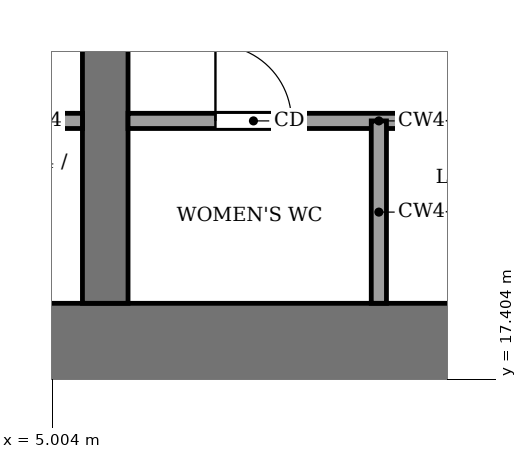
"""IFC4 building model, lengths in metres.
Left out: names, types, materials, properties, quantities, classifications, styles, units other than length and angle.
Written with IfcOpenShell. Run it as: python <this file> out.ifc"""

import sys

from ifc_helpers import new_model, si_unit, direction, frame, frame_2d, origin, place, context, subcontext, project, spatial, rectangle, extrude, element, fill, save


model = new_model("IFC4")
c1 = context("Model", 3, precision=1e-05, world=origin(), true_north=direction((0.0, 1.0)))
c2 = subcontext(c1, "Body", "Model", "MODEL_VIEW")
j1 = project(units=[si_unit("LENGTHUNIT", "METRE"), si_unit("PLANEANGLEUNIT", "RADIAN")], contexts=[c1])
p1 = place(None, origin())
s1 = spatial("IfcSite", under=j1, at=p1, CompositionType="ELEMENT")
p2 = place(p1, origin())
s2 = spatial("IfcBuilding", under=s1, at=p2, CompositionType="ELEMENT")
p3 = place(p2, frame((0.0, 0.0, 110.0)))
s3 = spatial("IfcBuildingStorey", under=s2, at=p3, CompositionType="ELEMENT", Elevation=110.0)
p4 = place(p3, frame((-13.8, 17.8, -0.13), z_axis=(0.0, 0.0, 1.0), x_axis=(1.0, 0.0, 0.0)))
e1 = element("IfcWall", 1, at=p4, inside=s3, PredefinedType="SHEAR", context=c2, shape_type="SweptSolid", body=[
    extrude(rectangle(XDim=27.6, YDim=1.2, at=frame_2d((13.8, 0.0))), origin(), (0.0, 0.0, 1.0), 3.88),
])
p5 = place(p3, frame((5.7, 18.4, -0.13), z_axis=(0.0, 0.0, 1.0), x_axis=(0.0, 1.0, 0.0)))
e2 = element("IfcWall", 2, at=p5, inside=s3, PredefinedType="SHEAR", context=c2, shape_type="SweptSolid", body=[
    extrude(rectangle(XDim=19.2, YDim=0.6, at=frame_2d((9.6, 0.0))), origin(), (0.0, 0.0, 1.0), 3.88),
])
p6 = place(p5, frame((8.35, 0.0, 0.13)))
e3 = element("IfcOpeningElement", 3, at=p6, cuts=e2, PredefinedType="OPENING", context=c2, shape_type="SweptSolid", body=[
    extrude(rectangle(XDim=0.9, YDim=2.1, at=frame_2d((0.45, 1.05))), frame((0.0, 0.31, 0.0), z_axis=(0.0, -1.0, 0.0), x_axis=(1.0, 0.0, 0.0)), (0.0, 0.0, 1.0), 0.62),
])
p7 = place(p5, frame((13.3, 0.0, 0.13)))
e4 = element("IfcOpeningElement", 4, at=p7, cuts=e2, PredefinedType="OPENING", context=c2, shape_type="SweptSolid", body=[
    extrude(rectangle(XDim=2.4, YDim=2.4, at=frame_2d((1.2, 1.2))), frame((0.0, 0.31, 0.0), z_axis=(0.0, -1.0, 0.0), x_axis=(1.0, 0.0, 0.0)), (0.0, 0.0, 1.0), 0.62),
])
p8 = place(p3, frame((-5.4, 20.8, 0.0), z_axis=(0.0, 0.0, 1.0), x_axis=(1.0, 0.0, 0.0)))
e5 = element("IfcWall", 5, at=p8, inside=s3, PredefinedType="PARTITIONING", context=c2, shape_type="SweptSolid", body=[
    extrude(rectangle(XDim=10.8, YDim=0.2, at=frame_2d((5.4, 0.0))), origin(), (0.0, 0.0, 1.0), 3.75),
])
p9 = place(p8, frame((0.75, 0.0, 0.0)))
e6 = element("IfcOpeningElement", 6, at=p9, cuts=e5, PredefinedType="OPENING", context=c2, shape_type="SweptSolid", body=[
    extrude(rectangle(XDim=1.2, YDim=2.2, at=frame_2d((0.6, 1.1))), frame((0.0, 0.11, 0.0), z_axis=(0.0, -1.0, 0.0), x_axis=(1.0, 0.0, 0.0)), (0.0, 0.0, 1.0), 0.22),
])
p10 = place(p8, frame((3.45, 0.0, 0.0)))
e7 = element("IfcOpeningElement", 7, at=p10, cuts=e5, PredefinedType="OPENING", context=c2, shape_type="SweptSolid", body=[
    extrude(rectangle(XDim=1.2, YDim=2.2, at=frame_2d((0.6, 1.1))), frame((0.0, 0.11, 0.0), z_axis=(0.0, -1.0, 0.0), x_axis=(1.0, 0.0, 0.0)), (0.0, 0.0, 1.0), 0.22),
])
p11 = place(p8, frame((6.15, 0.0, 0.0)))
e8 = element("IfcOpeningElement", 8, at=p11, cuts=e5, PredefinedType="OPENING", context=c2, shape_type="SweptSolid", body=[
    extrude(rectangle(XDim=1.2, YDim=2.2, at=frame_2d((0.6, 1.1))), frame((0.0, 0.11, 0.0), z_axis=(0.0, -1.0, 0.0), x_axis=(1.0, 0.0, 0.0)), (0.0, 0.0, 1.0), 0.22),
])
p12 = place(p8, frame((8.85, 0.0, 0.0)))
e9 = element("IfcOpeningElement", 9, at=p12, cuts=e5, PredefinedType="OPENING", context=c2, shape_type="SweptSolid", body=[
    extrude(rectangle(XDim=1.2, YDim=2.2, at=frame_2d((0.6, 1.1))), frame((0.0, 0.11, 0.0), z_axis=(0.0, -1.0, 0.0), x_axis=(1.0, 0.0, 0.0)), (0.0, 0.0, 1.0), 0.22),
])
p13 = place(p3, frame((6.0, 20.8, 0.0), z_axis=(0.0, 0.0, 1.0), x_axis=(1.0, 0.0, 0.0)))
e10 = element("IfcWall", 10, at=p13, inside=s3, PredefinedType="PARTITIONING", context=c2, shape_type="SweptSolid", body=[
    extrude(rectangle(XDim=6.6, YDim=0.2, at=frame_2d((3.3, 0.0))), origin(), (0.0, 0.0, 1.0), 3.75),
])
p14 = place(p13, frame((1.15, 0.0, 0.0)))
e11 = element("IfcOpeningElement", 11, at=p14, cuts=e10, PredefinedType="OPENING", context=c2, shape_type="SweptSolid", body=[
    extrude(rectangle(XDim=1.0, YDim=2.1, at=frame_2d((0.5, 1.05))), frame((0.0, 0.11, 0.0), z_axis=(0.0, -1.0, 0.0), x_axis=(1.0, 0.0, 0.0)), (0.0, 0.0, 1.0), 0.22),
])
p15 = place(p13, frame((4.45, 0.0, 0.0)))
e12 = element("IfcOpeningElement", 12, at=p15, cuts=e10, PredefinedType="OPENING", context=c2, shape_type="SweptSolid", body=[
    extrude(rectangle(XDim=1.0, YDim=2.1, at=frame_2d((0.5, 1.05))), frame((0.0, 0.11, 0.0), z_axis=(0.0, -1.0, 0.0), x_axis=(1.0, 0.0, 0.0)), (0.0, 0.0, 1.0), 0.22),
])
p16 = place(p3, frame((9.3, 18.4, 0.0), z_axis=(0.0, 0.0, 1.0), x_axis=(0.0, 1.0, 0.0)))
e13 = element("IfcWall", 13, at=p16, inside=s3, PredefinedType="PARTITIONING", context=c2, shape_type="SweptSolid", body=[
    extrude(rectangle(XDim=2.4, YDim=0.2, at=frame_2d((1.2, 0.0))), origin(), (0.0, 0.0, 1.0), 3.75),
])
p17 = place(p14, origin())
e14 = element("IfcDoor", 14, at=p17, inside=s3, OperationType="SINGLE_SWING_LEFT", PredefinedType="DOOR", context=c2, shape_type="SweptSolid", body=[
    extrude(rectangle(XDim=1.0, YDim=2.1, at=frame_2d((0.5, 1.05))), frame((0.0, 0.025, 0.0), z_axis=(0.0, -1.0, 0.0), x_axis=(1.0, 0.0, 0.0)), (0.0, 0.0, 1.0), 0.05),
])
fill(e11, e14)
save(model, sys.argv[1])
